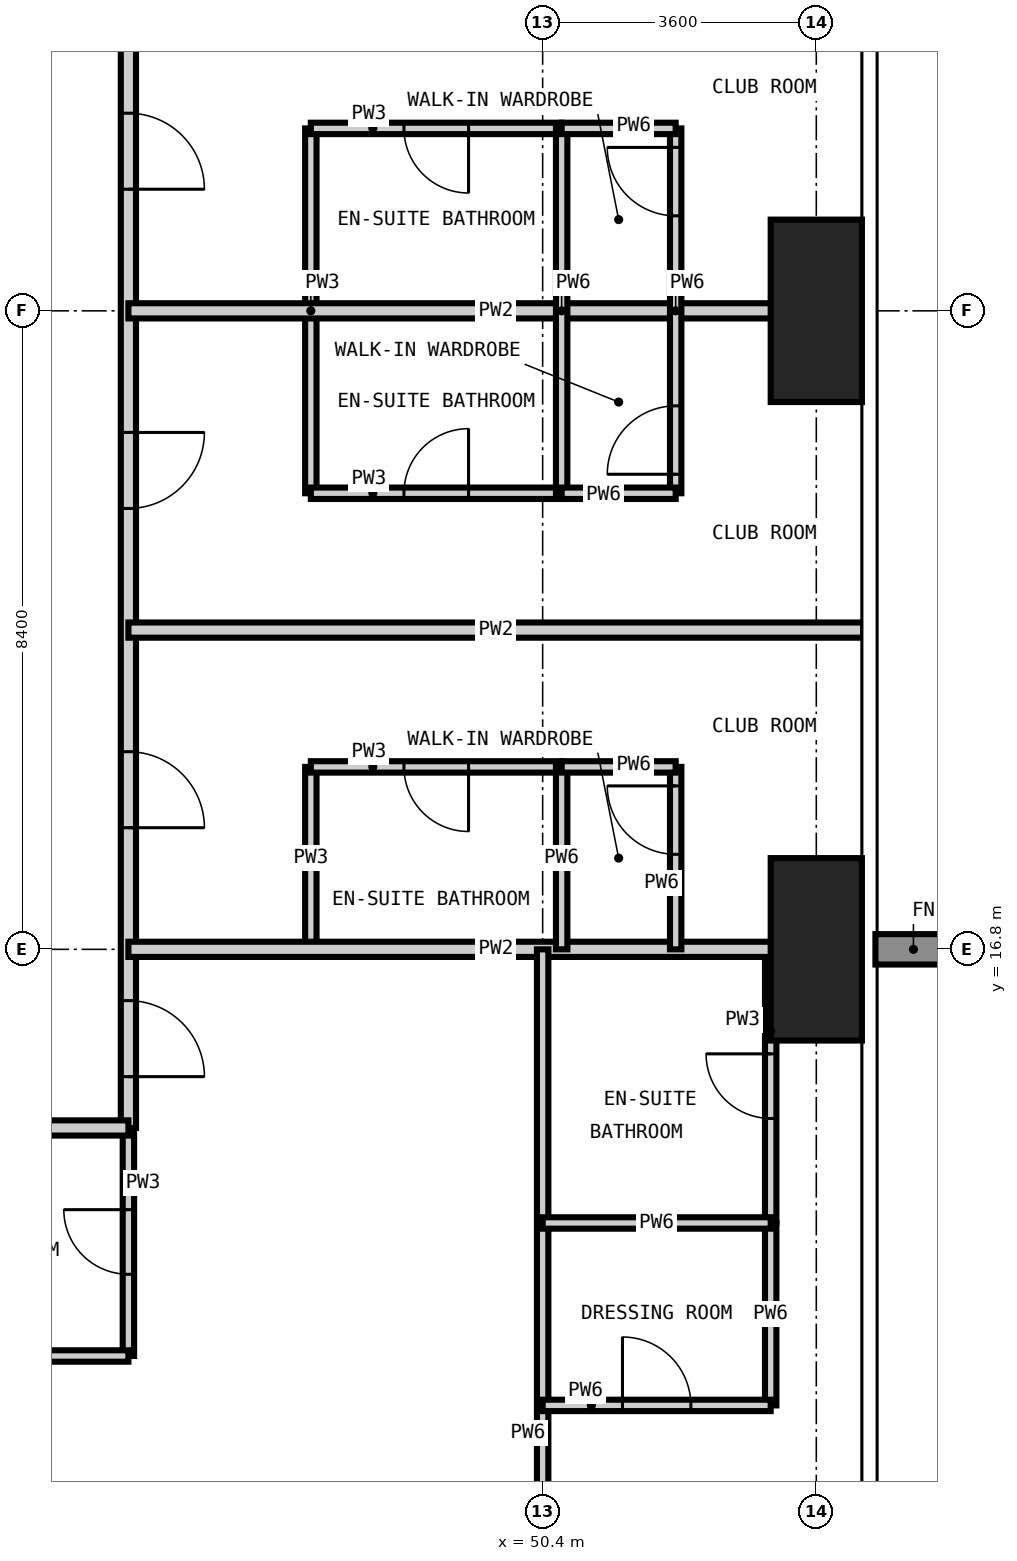
"""IFC4 building model, lengths in metres.
Left out: names, types, materials, properties, quantities, classifications, styles, units other than length and angle.
Written with IfcOpenShell. Run it as: python <this file> out.ifc"""

import sys

from ifc_helpers import new_model, si_unit, direction, frame, frame_2d, origin, origin_2d, place, context, subcontext, project, spatial, rectangle, extrude, element, fill, save


model = new_model("IFC4")
c1 = context("Model", 3, precision=1e-05, world=origin(), true_north=direction((0.0, 1.0)))
c2 = subcontext(c1, "Body", "Model", "MODEL_VIEW")
j1 = project(units=[si_unit("LENGTHUNIT", "METRE"), si_unit("PLANEANGLEUNIT", "RADIAN")], contexts=[c1])
p1 = place(None, origin())
s1 = spatial("IfcSite", under=j1, at=p1, CompositionType="ELEMENT")
p2 = place(p1, origin())
s2 = spatial("IfcBuilding", under=s1, at=p2, CompositionType="ELEMENT")
p3 = place(p2, frame((0.0, 0.0, 177.0)))
s3 = spatial("IfcBuildingStorey", under=s2, at=p3, CompositionType="ELEMENT", Elevation=177.0)
for number, where, z_axis, x_axis in (
    (1, (54.0, 16.8, -0.35), (0.0, 0.0, 1.0), (1.0, 0.0, 0.0)),
    (2, (54.0, 25.2, -0.35), (0.0, 0.0, 1.0), (1.0, 0.0, 0.0)),
):
    element("IfcColumn", number, at=place(p3, frame(where, z_axis=z_axis, x_axis=x_axis)), inside=s3, PredefinedType="COLUMN", context=c2, shape_type="SweptSolid", body=[
        extrude(rectangle(XDim=1.2, YDim=2.4, at=origin_2d()), origin(), (0.0, 0.0, 1.0), 3.6),
    ])
p4 = place(p3, frame((44.95, 11.45, 0.0), z_axis=(0.0, 0.0, 1.0), x_axis=(0.0, 1.0, 0.0)))
e3 = element("IfcWall", 3, at=p4, inside=s3, PredefinedType="PARTITIONING", context=c2, shape_type="SweptSolid", body=[
    extrude(rectangle(XDim=3.0, YDim=0.15, at=frame_2d((1.5, 0.0))), origin(), (0.0, 0.0, 1.0), 3.25),
])
p5 = place(p4, frame((1.075, 0.0, 0.0)))
e4 = element("IfcOpeningElement", 4, at=p5, cuts=e3, PredefinedType="OPENING", context=c2, shape_type="SweptSolid", body=[
    extrude(rectangle(XDim=0.85, YDim=2.1, at=frame_2d((0.425, 1.05))), frame((0.0, 0.085, 0.0), z_axis=(0.0, -1.0, 0.0), x_axis=(1.0, 0.0, 0.0)), (0.0, 0.0, 1.0), 0.17),
])
p6 = place(p3, frame((47.35, 16.8, 0.0), z_axis=(0.0, 0.0, 1.0), x_axis=(0.0, 1.0, 0.0)))
e5 = element("IfcWall", 5, at=p6, inside=s3, PredefinedType="PARTITIONING", context=c2, shape_type="SweptSolid", body=[
    extrude(rectangle(XDim=2.4, YDim=0.15, at=frame_2d((1.2, 0.0))), origin(), (0.0, 0.0, 1.0), 3.25),
])
p7 = place(p3, frame((47.35, 22.8, 0.0), z_axis=(0.0, 0.0, 1.0), x_axis=(0.0, 1.0, 0.0)))
e6 = element("IfcWall", 6, at=p7, inside=s3, PredefinedType="PARTITIONING", context=c2, shape_type="SweptSolid", body=[
    extrude(rectangle(XDim=4.8, YDim=0.15, at=frame_2d((2.4, 0.0))), origin(), (0.0, 0.0, 1.0), 3.25),
])
p8 = place(p3, frame((53.4, 13.2, 0.0), z_axis=(0.0, 0.0, 1.0), x_axis=(0.0, 1.0, 0.0)))
e7 = element("IfcWall", 7, at=p8, inside=s3, PredefinedType="PARTITIONING", context=c2, shape_type="SweptSolid", body=[
    extrude(rectangle(XDim=3.6, YDim=0.15, at=frame_2d((1.8, 0.0))), origin(), (0.0, 0.0, 1.0), 3.25),
])
p9 = place(p8, frame((1.375, 0.0, 0.0)))
e8 = element("IfcOpeningElement", 8, at=p9, cuts=e7, PredefinedType="OPENING", context=c2, shape_type="SweptSolid", body=[
    extrude(rectangle(XDim=0.85, YDim=2.1, at=frame_2d((0.425, 1.05))), frame((0.0, 0.085, 0.0), z_axis=(0.0, -1.0, 0.0), x_axis=(1.0, 0.0, 0.0)), (0.0, 0.0, 1.0), 0.17),
])
p10 = place(p3, frame((42.0, 11.45, 0.0), z_axis=(0.0, 0.0, 1.0), x_axis=(1.0, 0.0, 0.0)))
e9 = element("IfcWall", 9, at=p10, inside=s3, PredefinedType="PARTITIONING", context=c2, shape_type="SweptSolid", body=[
    extrude(rectangle(XDim=2.95, YDim=0.15, at=frame_2d((1.475, 0.0))), origin(), (0.0, 0.0, 1.0), 3.25),
])
p11 = place(p3, frame((47.35, 19.2, 0.0), z_axis=(0.0, 0.0, 1.0), x_axis=(1.0, 0.0, 0.0)))
e10 = element("IfcWall", 10, at=p11, inside=s3, PredefinedType="PARTITIONING", context=c2, shape_type="SweptSolid", body=[
    extrude(rectangle(XDim=3.3, YDim=0.15, at=frame_2d((1.65, 0.0))), origin(), (0.0, 0.0, 1.0), 3.25),
])
p12 = place(p11, frame((1.225, 0.0, 0.0)))
e11 = element("IfcOpeningElement", 11, at=p12, cuts=e10, PredefinedType="OPENING", context=c2, shape_type="SweptSolid", body=[
    extrude(rectangle(XDim=0.85, YDim=2.1, at=frame_2d((0.425, 1.05))), frame((0.0, 0.085, 0.0), z_axis=(0.0, -1.0, 0.0), x_axis=(1.0, 0.0, 0.0)), (0.0, 0.0, 1.0), 0.17),
])
p13 = place(p3, frame((47.35, 22.8, 0.0), z_axis=(0.0, 0.0, 1.0), x_axis=(1.0, 0.0, 0.0)))
e12 = element("IfcWall", 12, at=p13, inside=s3, PredefinedType="PARTITIONING", context=c2, shape_type="SweptSolid", body=[
    extrude(rectangle(XDim=3.3, YDim=0.15, at=frame_2d((1.65, 0.0))), origin(), (0.0, 0.0, 1.0), 3.25),
])
p14 = place(p13, frame((1.225, 0.0, 0.0)))
e13 = element("IfcOpeningElement", 13, at=p14, cuts=e12, PredefinedType="OPENING", context=c2, shape_type="SweptSolid", body=[
    extrude(rectangle(XDim=0.85, YDim=2.1, at=frame_2d((0.425, 1.05))), frame((0.0, 0.085, 0.0), z_axis=(0.0, -1.0, 0.0), x_axis=(1.0, 0.0, 0.0)), (0.0, 0.0, 1.0), 0.17),
])
p15 = place(p3, frame((47.35, 27.6, 0.0), z_axis=(0.0, 0.0, 1.0), x_axis=(1.0, 0.0, 0.0)))
e14 = element("IfcWall", 14, at=p15, inside=s3, PredefinedType="PARTITIONING", context=c2, shape_type="SweptSolid", body=[
    extrude(rectangle(XDim=3.3, YDim=0.15, at=frame_2d((1.65, 0.0))), origin(), (0.0, 0.0, 1.0), 3.25),
])
p16 = place(p15, frame((1.225, 0.0, 0.0)))
e15 = element("IfcOpeningElement", 15, at=p16, cuts=e14, PredefinedType="OPENING", context=c2, shape_type="SweptSolid", body=[
    extrude(rectangle(XDim=0.85, YDim=2.1, at=frame_2d((0.425, 1.05))), frame((0.0, 0.085, 0.0), z_axis=(0.0, -1.0, 0.0), x_axis=(1.0, 0.0, 0.0)), (0.0, 0.0, 1.0), 0.17),
])
p17 = place(p3, frame((44.95, 45.55, 0.0), z_axis=(0.0, 0.0, 1.0), x_axis=(0.0, -1.0, 0.0)))
e16 = element("IfcWall", 16, at=p17, inside=s3, PredefinedType="PARTITIONING", context=c2, shape_type="SweptSolid", body=[
    extrude(rectangle(XDim=31.1, YDim=0.2, at=frame_2d((15.55, 0.0))), origin(), (0.0, 0.0, 1.0), 3.25),
])
p18 = place(p17, frame((26.15, 0.0, 0.0)))
e17 = element("IfcOpeningElement", 17, at=p18, cuts=e16, PredefinedType="OPENING", context=c2, shape_type="SweptSolid", body=[
    extrude(rectangle(XDim=1.0, YDim=2.2, at=frame_2d((0.5, 1.1))), frame((0.0, 0.11, 0.0), z_axis=(0.0, -1.0, 0.0), x_axis=(1.0, 0.0, 0.0)), (0.0, 0.0, 1.0), 0.22),
])
p19 = place(p17, frame((21.95, 0.0, 0.0)))
e18 = element("IfcOpeningElement", 18, at=p19, cuts=e16, PredefinedType="OPENING", context=c2, shape_type="SweptSolid", body=[
    extrude(rectangle(XDim=1.0, YDim=2.2, at=frame_2d((0.5, 1.1))), frame((0.0, 0.11, 0.0), z_axis=(0.0, -1.0, 0.0), x_axis=(1.0, 0.0, 0.0)), (0.0, 0.0, 1.0), 0.22),
])
p20 = place(p17, frame((17.75, 0.0, 0.0)))
e19 = element("IfcOpeningElement", 19, at=p20, cuts=e16, PredefinedType="OPENING", context=c2, shape_type="SweptSolid", body=[
    extrude(rectangle(XDim=1.0, YDim=2.2, at=frame_2d((0.5, 1.1))), frame((0.0, 0.11, 0.0), z_axis=(0.0, -1.0, 0.0), x_axis=(1.0, 0.0, 0.0)), (0.0, 0.0, 1.0), 0.22),
])
p21 = place(p17, frame((13.55, 0.0, 0.0)))
e20 = element("IfcOpeningElement", 20, at=p21, cuts=e16, PredefinedType="OPENING", context=c2, shape_type="SweptSolid", body=[
    extrude(rectangle(XDim=1.0, YDim=2.2, at=frame_2d((0.5, 1.1))), frame((0.0, 0.11, 0.0), z_axis=(0.0, -1.0, 0.0), x_axis=(1.0, 0.0, 0.0)), (0.0, 0.0, 1.0), 0.22),
])
p22 = place(p17, frame((9.35, 0.0, 0.0)))
e21 = element("IfcOpeningElement", 21, at=p22, cuts=e16, PredefinedType="OPENING", context=c2, shape_type="SweptSolid", body=[
    extrude(rectangle(XDim=1.0, YDim=2.2, at=frame_2d((0.5, 1.1))), frame((0.0, 0.11, 0.0), z_axis=(0.0, -1.0, 0.0), x_axis=(1.0, 0.0, 0.0)), (0.0, 0.0, 1.0), 0.22),
])
p23 = place(p17, frame((5.15, 0.0, 0.0)))
e22 = element("IfcOpeningElement", 22, at=p23, cuts=e16, PredefinedType="OPENING", context=c2, shape_type="SweptSolid", body=[
    extrude(rectangle(XDim=1.0, YDim=2.2, at=frame_2d((0.5, 1.1))), frame((0.0, 0.11, 0.0), z_axis=(0.0, -1.0, 0.0), x_axis=(1.0, 0.0, 0.0)), (0.0, 0.0, 1.0), 0.22),
])
p24 = place(p17, frame((29.425, 0.0, 0.0)))
e23 = element("IfcOpeningElement", 23, at=p24, cuts=e16, PredefinedType="OPENING", context=c2, shape_type="SweptSolid", body=[
    extrude(rectangle(XDim=1.0, YDim=2.2, at=frame_2d((0.5, 1.1))), frame((0.0, 0.11, 0.0), z_axis=(0.0, -1.0, 0.0), x_axis=(1.0, 0.0, 0.0)), (0.0, 0.0, 1.0), 0.22),
])
p25 = place(p17, frame((1.275, 0.0, 0.0)))
e24 = element("IfcOpeningElement", 24, at=p25, cuts=e16, PredefinedType="OPENING", context=c2, shape_type="SweptSolid", body=[
    extrude(rectangle(XDim=1.0, YDim=2.2, at=frame_2d((0.5, 1.1))), frame((0.0, 0.11, 0.0), z_axis=(0.0, -1.0, 0.0), x_axis=(1.0, 0.0, 0.0)), (0.0, 0.0, 1.0), 0.22),
])
p26 = place(p3, frame((44.95, 14.45, 0.0), z_axis=(0.0, 0.0, 1.0), x_axis=(-1.0, 0.0, 0.0)))
e25 = element("IfcWall", 25, at=p26, inside=s3, PredefinedType="PARTITIONING", context=c2, shape_type="SweptSolid", body=[
    extrude(rectangle(XDim=30.5, YDim=0.2, at=frame_2d((15.25, 0.0))), origin(), (0.0, 0.0, 1.0), 3.25),
])
p27 = place(p26, frame((24.65, 0.0, 0.0)))
e26 = element("IfcOpeningElement", 26, at=p27, cuts=e25, PredefinedType="OPENING", context=c2, shape_type="SweptSolid", body=[
    extrude(rectangle(XDim=1.0, YDim=2.2, at=frame_2d((0.5, 1.1))), frame((0.0, 0.11, 0.0), z_axis=(0.0, -1.0, 0.0), x_axis=(1.0, 0.0, 0.0)), (0.0, 0.0, 1.0), 0.22),
])
p28 = place(p26, frame((13.85, 0.0, 0.0)))
e27 = element("IfcOpeningElement", 27, at=p28, cuts=e25, PredefinedType="OPENING", context=c2, shape_type="SweptSolid", body=[
    extrude(rectangle(XDim=1.0, YDim=2.2, at=frame_2d((0.5, 1.1))), frame((0.0, 0.11, 0.0), z_axis=(0.0, -1.0, 0.0), x_axis=(1.0, 0.0, 0.0)), (0.0, 0.0, 1.0), 0.22),
])
p29 = place(p26, frame((7.85, 0.0, 0.0)))
e28 = element("IfcOpeningElement", 28, at=p29, cuts=e25, PredefinedType="OPENING", context=c2, shape_type="SweptSolid", body=[
    extrude(rectangle(XDim=1.0, YDim=2.2, at=frame_2d((0.5, 1.1))), frame((0.0, 0.11, 0.0), z_axis=(0.0, -1.0, 0.0), x_axis=(1.0, 0.0, 0.0)), (0.0, 0.0, 1.0), 0.22),
])
for number, where, z_axis, x_axis in (
    (29, (44.95, 16.8, 0.0), (0.0, 0.0, 1.0), (1.0, 0.0, 0.0)),
    (30, (44.95, 21.0, 0.0), (0.0, 0.0, 1.0), (1.0, 0.0, 0.0)),
    (31, (44.95, 25.2, 0.0), (0.0, 0.0, 1.0), (1.0, 0.0, 0.0)),
):
    element("IfcWall", number, at=place(p3, frame(where, z_axis=z_axis, x_axis=x_axis)), inside=s3, PredefinedType="PARTITIONING", context=c2, shape_type="SweptSolid", body=[
        extrude(rectangle(XDim=9.668, YDim=0.2, at=frame_2d((4.834, 0.0))), origin(), (0.0, 0.0, 1.0), 3.25),
    ])
p30 = place(p3, frame((50.4, 4.182, 0.0), z_axis=(0.0, 0.0, 1.0), x_axis=(0.0, 1.0, 0.0)))
e32 = element("IfcWall", 32, at=p30, inside=s3, PredefinedType="PARTITIONING", context=c2, shape_type="SweptSolid", body=[
    extrude(rectangle(XDim=12.618, YDim=0.15, at=frame_2d((6.309, 0.0))), origin(), (0.0, 0.0, 1.0), 3.25),
])
p31 = place(p30, frame((2.868, 0.0, 0.0)))
e33 = element("IfcOpeningElement", 33, at=p31, cuts=e32, PredefinedType="OPENING", context=c2, shape_type="SweptSolid", body=[
    extrude(rectangle(XDim=0.9, YDim=2.1, at=frame_2d((0.45, 1.05))), frame((0.0, 0.085, 0.0), z_axis=(0.0, -1.0, 0.0), x_axis=(1.0, 0.0, 0.0)), (0.0, 0.0, 1.0), 0.17),
])
p32 = place(p3, frame((50.65, 16.8, 0.0), z_axis=(0.0, 0.0, 1.0), x_axis=(0.0, 1.0, 0.0)))
e34 = element("IfcWall", 34, at=p32, inside=s3, PredefinedType="PARTITIONING", context=c2, shape_type="SweptSolid", body=[
    extrude(rectangle(XDim=2.4, YDim=0.15, at=frame_2d((1.2, 0.0))), origin(), (0.0, 0.0, 1.0), 3.25),
])
p33 = place(p3, frame((50.65, 22.8, 0.0), z_axis=(0.0, 0.0, 1.0), x_axis=(0.0, 1.0, 0.0)))
e35 = element("IfcWall", 35, at=p33, inside=s3, PredefinedType="PARTITIONING", context=c2, shape_type="SweptSolid", body=[
    extrude(rectangle(XDim=4.8, YDim=0.15, at=frame_2d((2.4, 0.0))), origin(), (0.0, 0.0, 1.0), 3.25),
])
p34 = place(p3, frame((52.15, 16.8, 0.0), z_axis=(0.0, 0.0, 1.0), x_axis=(0.0, 1.0, 0.0)))
e36 = element("IfcWall", 36, at=p34, inside=s3, PredefinedType="PARTITIONING", context=c2, shape_type="SweptSolid", body=[
    extrude(rectangle(XDim=2.4, YDim=0.15, at=frame_2d((1.2, 0.0))), origin(), (0.0, 0.0, 1.0), 3.25),
])
p35 = place(p34, frame((1.25, 0.0, 0.0)))
e37 = element("IfcOpeningElement", 37, at=p35, cuts=e36, PredefinedType="OPENING", context=c2, shape_type="SweptSolid", body=[
    extrude(rectangle(XDim=0.9, YDim=2.1, at=frame_2d((0.45, 1.05))), frame((0.0, 0.085, 0.0), z_axis=(0.0, -1.0, 0.0), x_axis=(1.0, 0.0, 0.0)), (0.0, 0.0, 1.0), 0.17),
])
p36 = place(p3, frame((52.15, 22.8, 0.0), z_axis=(0.0, 0.0, 1.0), x_axis=(0.0, 1.0, 0.0)))
e38 = element("IfcWall", 38, at=p36, inside=s3, PredefinedType="PARTITIONING", context=c2, shape_type="SweptSolid", body=[
    extrude(rectangle(XDim=4.8, YDim=0.15, at=frame_2d((2.4, 0.0))), origin(), (0.0, 0.0, 1.0), 3.25),
])
p37 = place(p36, frame((0.25, 0.0, 0.0)))
e39 = element("IfcOpeningElement", 39, at=p37, cuts=e38, PredefinedType="OPENING", context=c2, shape_type="SweptSolid", body=[
    extrude(rectangle(XDim=0.9, YDim=2.1, at=frame_2d((0.45, 1.05))), frame((0.0, 0.085, 0.0), z_axis=(0.0, -1.0, 0.0), x_axis=(1.0, 0.0, 0.0)), (0.0, 0.0, 1.0), 0.17),
])
p38 = place(p36, frame((3.65, 0.0, 0.0)))
e40 = element("IfcOpeningElement", 40, at=p38, cuts=e38, PredefinedType="OPENING", context=c2, shape_type="SweptSolid", body=[
    extrude(rectangle(XDim=0.9, YDim=2.1, at=frame_2d((0.45, 1.05))), frame((0.0, 0.085, 0.0), z_axis=(0.0, -1.0, 0.0), x_axis=(1.0, 0.0, 0.0)), (0.0, 0.0, 1.0), 0.17),
])
p39 = place(p3, frame((53.4, 10.8, 0.0), z_axis=(0.0, 0.0, 1.0), x_axis=(0.0, 1.0, 0.0)))
e41 = element("IfcWall", 41, at=p39, inside=s3, PredefinedType="PARTITIONING", context=c2, shape_type="SweptSolid", body=[
    extrude(rectangle(XDim=2.4, YDim=0.15, at=frame_2d((1.2, 0.0))), origin(), (0.0, 0.0, 1.0), 3.25),
])
p40 = place(p3, frame((50.4, 10.8, 0.0), z_axis=(0.0, 0.0, 1.0), x_axis=(1.0, 0.0, 0.0)))
e42 = element("IfcWall", 42, at=p40, inside=s3, PredefinedType="PARTITIONING", context=c2, shape_type="SweptSolid", body=[
    extrude(rectangle(XDim=3.0, YDim=0.15, at=frame_2d((1.5, 0.0))), origin(), (0.0, 0.0, 1.0), 3.25),
])
p41 = place(p40, frame((1.05, 0.0, 0.0)))
e43 = element("IfcOpeningElement", 43, at=p41, cuts=e42, PredefinedType="OPENING", context=c2, shape_type="SweptSolid", body=[
    extrude(rectangle(XDim=0.9, YDim=2.1, at=frame_2d((0.45, 1.05))), frame((0.0, 0.085, 0.0), z_axis=(0.0, -1.0, 0.0), x_axis=(1.0, 0.0, 0.0)), (0.0, 0.0, 1.0), 0.17),
])
p42 = place(p3, frame((50.4, 13.2, 0.0), z_axis=(0.0, 0.0, 1.0), x_axis=(1.0, 0.0, 0.0)))
e44 = element("IfcWall", 44, at=p42, inside=s3, PredefinedType="PARTITIONING", context=c2, shape_type="SweptSolid", body=[
    extrude(rectangle(XDim=3.0, YDim=0.15, at=frame_2d((1.5, 0.0))), origin(), (0.0, 0.0, 1.0), 3.25),
])
for number, where, z_axis, x_axis in (
    (45, (50.65, 19.2, 0.0), (0.0, 0.0, 1.0), (1.0, 0.0, 0.0)),
    (46, (50.65, 22.8, 0.0), (0.0, 0.0, 1.0), (1.0, 0.0, 0.0)),
    (47, (50.65, 27.6, 0.0), (0.0, 0.0, 1.0), (1.0, 0.0, 0.0)),
):
    element("IfcWall", number, at=place(p3, frame(where, z_axis=z_axis, x_axis=x_axis)), inside=s3, PredefinedType="PARTITIONING", context=c2, shape_type="SweptSolid", body=[
        extrude(rectangle(XDim=1.5, YDim=0.15, at=frame_2d((0.75, 0.0))), origin(), (0.0, 0.0, 1.0), 3.25),
    ])
p43 = place(p18, origin())
e48 = element("IfcDoor", 48, at=p43, inside=s3, OperationType="SINGLE_SWING_RIGHT", PredefinedType="DOOR", context=c2, shape_type="SweptSolid", body=[
    extrude(rectangle(XDim=1.0, YDim=2.2, at=frame_2d((0.5, 1.1))), frame((0.0, 0.025, 0.0), z_axis=(0.0, -1.0, 0.0), x_axis=(1.0, 0.0, 0.0)), (0.0, 0.0, 1.0), 0.05),
])
fill(e17, e48)
p44 = place(p12, frame((0.85, 0.0, 0.0), z_axis=(0.0, 0.0, 1.0), x_axis=(-1.0, 0.0, 0.0)))
e49 = element("IfcDoor", 49, at=p44, inside=s3, OperationType="SINGLE_SWING_LEFT", PredefinedType="DOOR", context=c2, shape_type="SweptSolid", body=[
    extrude(rectangle(XDim=0.85, YDim=2.1, at=frame_2d((0.425, 1.05))), frame((0.0, 0.025, 0.0), z_axis=(0.0, -1.0, 0.0), x_axis=(1.0, 0.0, 0.0)), (0.0, 0.0, 1.0), 0.05),
])
fill(e11, e49)
p45 = place(p35, origin())
e50 = element("IfcDoor", 50, at=p45, inside=s3, OperationType="SINGLE_SWING_RIGHT", PredefinedType="DOOR", context=c2, shape_type="SweptSolid", body=[
    extrude(rectangle(XDim=0.9, YDim=2.1, at=frame_2d((0.45, 1.05))), frame((0.0, 0.025, 0.0), z_axis=(0.0, -1.0, 0.0), x_axis=(1.0, 0.0, 0.0)), (0.0, 0.0, 1.0), 0.05),
])
fill(e37, e50)
p46 = place(p19, origin())
e51 = element("IfcDoor", 51, at=p46, inside=s3, OperationType="SINGLE_SWING_LEFT", PredefinedType="DOOR", context=c2, shape_type="SweptSolid", body=[
    extrude(rectangle(XDim=1.0, YDim=2.2, at=frame_2d((0.5, 1.1))), frame((0.0, 0.025, 0.0), z_axis=(0.0, -1.0, 0.0), x_axis=(1.0, 0.0, 0.0)), (0.0, 0.0, 1.0), 0.05),
])
fill(e18, e51)
p47 = place(p14, origin())
e52 = element("IfcDoor", 52, at=p47, inside=s3, OperationType="SINGLE_SWING_RIGHT", PredefinedType="DOOR", context=c2, shape_type="SweptSolid", body=[
    extrude(rectangle(XDim=0.85, YDim=2.1, at=frame_2d((0.425, 1.05))), frame((0.0, 0.025, 0.0), z_axis=(0.0, -1.0, 0.0), x_axis=(1.0, 0.0, 0.0)), (0.0, 0.0, 1.0), 0.05),
])
fill(e13, e52)
p48 = place(p37, origin())
e53 = element("IfcDoor", 53, at=p48, inside=s3, OperationType="SINGLE_SWING_LEFT", PredefinedType="DOOR", context=c2, shape_type="SweptSolid", body=[
    extrude(rectangle(XDim=0.9, YDim=2.1, at=frame_2d((0.45, 1.05))), frame((0.0, 0.025, 0.0), z_axis=(0.0, -1.0, 0.0), x_axis=(1.0, 0.0, 0.0)), (0.0, 0.0, 1.0), 0.05),
])
fill(e39, e53)
p49 = place(p20, origin())
e54 = element("IfcDoor", 54, at=p49, inside=s3, OperationType="SINGLE_SWING_RIGHT", PredefinedType="DOOR", context=c2, shape_type="SweptSolid", body=[
    extrude(rectangle(XDim=1.0, YDim=2.2, at=frame_2d((0.5, 1.1))), frame((0.0, 0.025, 0.0), z_axis=(0.0, -1.0, 0.0), x_axis=(1.0, 0.0, 0.0)), (0.0, 0.0, 1.0), 0.05),
])
fill(e19, e54)
p50 = place(p16, frame((0.85, 0.0, 0.0), z_axis=(0.0, 0.0, 1.0), x_axis=(-1.0, 0.0, 0.0)))
e55 = element("IfcDoor", 55, at=p50, inside=s3, OperationType="SINGLE_SWING_LEFT", PredefinedType="DOOR", context=c2, shape_type="SweptSolid", body=[
    extrude(rectangle(XDim=0.85, YDim=2.1, at=frame_2d((0.425, 1.05))), frame((0.0, 0.025, 0.0), z_axis=(0.0, -1.0, 0.0), x_axis=(1.0, 0.0, 0.0)), (0.0, 0.0, 1.0), 0.05),
])
fill(e15, e55)
p51 = place(p38, origin())
e56 = element("IfcDoor", 56, at=p51, inside=s3, OperationType="SINGLE_SWING_RIGHT", PredefinedType="DOOR", context=c2, shape_type="SweptSolid", body=[
    extrude(rectangle(XDim=0.9, YDim=2.1, at=frame_2d((0.45, 1.05))), frame((0.0, 0.025, 0.0), z_axis=(0.0, -1.0, 0.0), x_axis=(1.0, 0.0, 0.0)), (0.0, 0.0, 1.0), 0.05),
])
fill(e40, e56)
p52 = place(p24, origin())
e57 = element("IfcDoor", 57, at=p52, inside=s3, OperationType="SINGLE_SWING_RIGHT", PredefinedType="DOOR", context=c2, shape_type="SweptSolid", body=[
    extrude(rectangle(XDim=1.0, YDim=2.2, at=frame_2d((0.5, 1.1))), frame((0.0, 0.025, 0.0), z_axis=(0.0, -1.0, 0.0), x_axis=(1.0, 0.0, 0.0)), (0.0, 0.0, 1.0), 0.05),
])
fill(e23, e57)
p53 = place(p5, origin())
e58 = element("IfcDoor", 58, at=p53, inside=s3, OperationType="SINGLE_SWING_RIGHT", PredefinedType="DOOR", context=c2, shape_type="SweptSolid", body=[
    extrude(rectangle(XDim=0.85, YDim=2.1, at=frame_2d((0.425, 1.05))), frame((0.0, 0.025, 0.0), z_axis=(0.0, -1.0, 0.0), x_axis=(1.0, 0.0, 0.0)), (0.0, 0.0, 1.0), 0.05),
])
fill(e4, e58)
p54 = place(p9, origin())
e59 = element("IfcDoor", 59, at=p54, inside=s3, OperationType="SINGLE_SWING_RIGHT", PredefinedType="DOOR", context=c2, shape_type="SweptSolid", body=[
    extrude(rectangle(XDim=0.85, YDim=2.1, at=frame_2d((0.425, 1.05))), frame((0.0, 0.025, 0.0), z_axis=(0.0, -1.0, 0.0), x_axis=(1.0, 0.0, 0.0)), (0.0, 0.0, 1.0), 0.05),
])
fill(e8, e59)
p55 = place(p41, origin())
e60 = element("IfcDoor", 60, at=p55, inside=s3, OperationType="SINGLE_SWING_LEFT", PredefinedType="DOOR", context=c2, shape_type="SweptSolid", body=[
    extrude(rectangle(XDim=0.9, YDim=2.1, at=frame_2d((0.45, 1.05))), frame((0.0, 0.025, 0.0), z_axis=(0.0, -1.0, 0.0), x_axis=(1.0, 0.0, 0.0)), (0.0, 0.0, 1.0), 0.05),
])
fill(e43, e60)
save(model, sys.argv[1])
